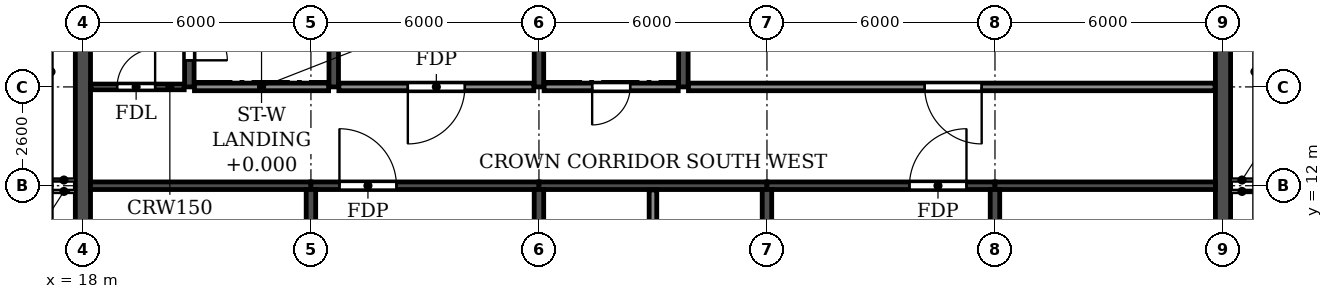
"""IFC4 building model, lengths in metres.
Left out: names, types, materials, properties, quantities, classifications, styles, units other than length and angle.
Written with IfcOpenShell. Run it as: python <this file> out.ifc"""

import sys

from ifc_helpers import new_model, si_unit, direction, frame, frame_2d, origin, place, context, subcontext, project, spatial, rectangle, extrude, element, fill, save


model = new_model("IFC4")
c1 = context("Model", 3, precision=1e-05, world=origin(), true_north=direction((0.0, 1.0)))
c2 = subcontext(c1, "Body", "Model", "MODEL_VIEW")
j1 = project(units=[si_unit("LENGTHUNIT", "METRE"), si_unit("PLANEANGLEUNIT", "RADIAN")], contexts=[c1])
p1 = place(None, origin())
s1 = spatial("IfcSite", under=j1, at=p1, CompositionType="ELEMENT")
p2 = place(p1, origin())
s2 = spatial("IfcBuilding", under=s1, at=p2, CompositionType="ELEMENT")
p3 = place(p2, frame((0.0, 0.0, 282.3)))
s3 = spatial("IfcBuildingStorey", under=s2, at=p3, CompositionType="ELEMENT", Elevation=282.3)
for number, where, z_axis, x_axis in (
    (1, (24.0, 0.2, 0.0), (0.0, 0.0, 1.0), (0.0, 1.0, 0.0)),
    (2, (30.0, 0.2, 0.0), (0.0, 0.0, 1.0), (0.0, 1.0, 0.0)),
    (3, (36.0, 0.2, 0.0), (0.0, 0.0, 1.0), (0.0, 1.0, 0.0)),
    (4, (42.0, 0.2, 0.0), (0.0, 0.0, 1.0), (0.0, 1.0, 0.0)),
):
    element("IfcWall", number, at=place(p3, frame(where, z_axis=z_axis, x_axis=x_axis)), inside=s3, PredefinedType="SHEAR", context=c2, shape_type="SweptSolid", body=[
        extrude(rectangle(XDim=11.7, YDim=0.25, at=frame_2d((5.85, 0.0))), origin(), (0.0, 0.0, 1.0), 3.05),
    ])
p4 = place(p3, frame((18.0, 4.683, 0.0), z_axis=(0.0, 0.0, 1.0), x_axis=(0.0, 1.0, 0.0)))
e5 = element("IfcWall", 5, at=p4, inside=s3, PredefinedType="SHEAR", context=c2, shape_type="SweptSolid", body=[
    extrude(rectangle(XDim=31.834, YDim=0.4, at=frame_2d((15.917, 0.0))), origin(), (0.0, 0.0, 1.0), 3.05),
])
p5 = place(p3, frame((48.0, 0.2, 0.0), z_axis=(0.0, 0.0, 1.0), x_axis=(0.0, 1.0, 0.0)))
e6 = element("IfcWall", 6, at=p5, inside=s3, PredefinedType="SHEAR", context=c2, shape_type="SweptSolid", body=[
    extrude(rectangle(XDim=40.8, YDim=0.4, at=frame_2d((20.4, 0.0))), origin(), (0.0, 0.0, 1.0), 3.05),
])
p6 = place(p3, frame((18.2, 12.0, 0.0), z_axis=(0.0, 0.0, 1.0), x_axis=(1.0, 0.0, 0.0)))
e7 = element("IfcWall", 7, at=p6, inside=s3, PredefinedType="SHEAR", context=c2, shape_type="SweptSolid", body=[
    extrude(rectangle(XDim=5.8, YDim=0.2, at=frame_2d((2.9, 0.0))), origin(), (0.0, 0.0, 1.0), 2.45),
])
p7 = place(p3, frame((24.0, 12.0, 0.0), z_axis=(0.0, 0.0, 1.0), x_axis=(1.0, 0.0, 0.0)))
e8 = element("IfcWall", 8, at=p7, inside=s3, PredefinedType="SHEAR", context=c2, shape_type="SweptSolid", body=[
    extrude(rectangle(XDim=6.0, YDim=0.2, at=frame_2d((3.0, 0.0))), origin(), (0.0, 0.0, 1.0), 2.45),
])
p8 = place(p7, frame((0.75, 0.0, 0.0)))
e9 = element("IfcOpeningElement", 9, at=p8, cuts=e8, PredefinedType="OPENING", context=c2, shape_type="SweptSolid", body=[
    extrude(rectangle(XDim=1.5, YDim=2.1, at=frame_2d((0.75, 1.05))), frame((0.0, 0.11, 0.0), z_axis=(0.0, -1.0, 0.0), x_axis=(1.0, 0.0, 0.0)), (0.0, 0.0, 1.0), 0.22),
])
p9 = place(p3, frame((30.0, 12.0, 0.0), z_axis=(0.0, 0.0, 1.0), x_axis=(1.0, 0.0, 0.0)))
e10 = element("IfcWall", 10, at=p9, inside=s3, PredefinedType="SHEAR", context=c2, shape_type="SweptSolid", body=[
    extrude(rectangle(XDim=6.0, YDim=0.2, at=frame_2d((3.0, 0.0))), origin(), (0.0, 0.0, 1.0), 2.45),
])
p10 = place(p3, frame((36.0, 12.0, 0.0), z_axis=(0.0, 0.0, 1.0), x_axis=(1.0, 0.0, 0.0)))
e11 = element("IfcWall", 11, at=p10, inside=s3, PredefinedType="SHEAR", context=c2, shape_type="SweptSolid", body=[
    extrude(rectangle(XDim=6.0, YDim=0.2, at=frame_2d((3.0, 0.0))), origin(), (0.0, 0.0, 1.0), 2.45),
])
p11 = place(p10, frame((3.75, 0.0, 0.0)))
e12 = element("IfcOpeningElement", 12, at=p11, cuts=e11, PredefinedType="OPENING", context=c2, shape_type="SweptSolid", body=[
    extrude(rectangle(XDim=1.5, YDim=2.1, at=frame_2d((0.75, 1.05))), frame((0.0, 0.11, 0.0), z_axis=(0.0, -1.0, 0.0), x_axis=(1.0, 0.0, 0.0)), (0.0, 0.0, 1.0), 0.22),
])
p12 = place(p3, frame((42.0, 12.0, 0.0), z_axis=(0.0, 0.0, 1.0), x_axis=(1.0, 0.0, 0.0)))
e13 = element("IfcWall", 13, at=p12, inside=s3, PredefinedType="SHEAR", context=c2, shape_type="SweptSolid", body=[
    extrude(rectangle(XDim=5.8, YDim=0.2, at=frame_2d((2.9, 0.0))), origin(), (0.0, 0.0, 1.0), 2.45),
])
p13 = place(p3, frame((20.8, 14.6, 0.0), z_axis=(0.0, 0.0, 1.0), x_axis=(0.0, 1.0, 0.0)))
e14 = element("IfcWall", 14, at=p13, inside=s3, PredefinedType="SOLIDWALL", context=c2, shape_type="SweptSolid", body=[
    extrude(rectangle(XDim=7.875, YDim=0.25, at=frame_2d((3.938, 0.0))), origin(), (0.0, 0.0, 1.0), 3.05),
])
p14 = place(p13, frame((0.7, 0.0, 0.0)))
e15 = element("IfcOpeningElement", 15, at=p14, cuts=e14, PredefinedType="OPENING", context=c2, shape_type="SweptSolid", body=[
    extrude(rectangle(XDim=1.0, YDim=2.1, at=frame_2d((0.5, 1.05))), frame((0.0, 0.135, 0.0), z_axis=(0.0, -1.0, 0.0), x_axis=(1.0, 0.0, 0.0)), (0.0, 0.0, 1.0), 0.27),
])
for number, where, z_axis, x_axis in (
    (16, (24.6, 14.6, 0.0), (0.0, 0.0, 1.0), (0.0, 1.0, 0.0)),
    (17, (30.0, 14.6, 0.0), (0.0, 0.0, 1.0), (0.0, 1.0, 0.0)),
    (18, (33.8, 14.6, 0.0), (0.0, 0.0, 1.0), (0.0, 1.0, 0.0)),
):
    element("IfcWall", number, at=place(p3, frame(where, z_axis=z_axis, x_axis=x_axis)), inside=s3, PredefinedType="SOLIDWALL", context=c2, shape_type="SweptSolid", body=[
        extrude(rectangle(XDim=7.875, YDim=0.25, at=frame_2d((3.938, 0.0))), origin(), (0.0, 0.0, 1.0), 3.05),
    ])
p15 = place(p3, frame((18.21, 14.6, 0.0), z_axis=(0.0, 0.0, 1.0), x_axis=(1.0, 0.0, 0.0)))
e19 = element("IfcWall", 19, at=p15, inside=s3, PredefinedType="PARTITIONING", context=c2, shape_type="SweptSolid", body=[
    extrude(rectangle(XDim=2.455, YDim=0.15, at=frame_2d((1.228, 0.0))), origin(), (0.0, 0.0, 1.0), 3.05),
])
p16 = place(p15, frame((0.69, 0.0, 0.0)))
e20 = element("IfcOpeningElement", 20, at=p16, cuts=e19, PredefinedType="OPENING", context=c2, shape_type="SweptSolid", body=[
    extrude(rectangle(XDim=1.0, YDim=2.1, at=frame_2d((0.5, 1.05))), frame((0.0, 0.085, 0.0), z_axis=(0.0, -1.0, 0.0), x_axis=(1.0, 0.0, 0.0)), (0.0, 0.0, 1.0), 0.17),
])
p17 = place(p3, frame((24.735, 14.6, 0.0), z_axis=(0.0, 0.0, 1.0), x_axis=(1.0, 0.0, 0.0)))
e21 = element("IfcWall", 21, at=p17, inside=s3, PredefinedType="PARTITIONING", context=c2, shape_type="SweptSolid", body=[
    extrude(rectangle(XDim=5.13, YDim=0.2, at=frame_2d((2.565, 0.0))), origin(), (0.0, 0.0, 1.0), 3.05),
])
p18 = place(p17, frame((1.815, 0.0, 0.0)))
e22 = element("IfcOpeningElement", 22, at=p18, cuts=e21, PredefinedType="OPENING", context=c2, shape_type="SweptSolid", body=[
    extrude(rectangle(XDim=1.5, YDim=2.1, at=frame_2d((0.75, 1.05))), frame((0.0, 0.11, 0.0), z_axis=(0.0, -1.0, 0.0), x_axis=(1.0, 0.0, 0.0)), (0.0, 0.0, 1.0), 0.22),
])
p19 = place(p3, frame((33.935, 14.6, 0.0), z_axis=(0.0, 0.0, 1.0), x_axis=(1.0, 0.0, 0.0)))
e23 = element("IfcWall", 23, at=p19, inside=s3, PredefinedType="PARTITIONING", context=c2, shape_type="SweptSolid", body=[
    extrude(rectangle(XDim=13.855, YDim=0.2, at=frame_2d((6.927, 0.0))), origin(), (0.0, 0.0, 1.0), 3.05),
])
p20 = place(p19, frame((6.215, 0.0, 0.0)))
e24 = element("IfcOpeningElement", 24, at=p20, cuts=e23, PredefinedType="OPENING", context=c2, shape_type="SweptSolid", body=[
    extrude(rectangle(XDim=1.5, YDim=2.1, at=frame_2d((0.75, 1.05))), frame((0.0, 0.11, 0.0), z_axis=(0.0, -1.0, 0.0), x_axis=(1.0, 0.0, 0.0)), (0.0, 0.0, 1.0), 0.22),
])
p21 = place(p3, frame((33.0, 0.06, 0.0), z_axis=(0.0, 0.0, 1.0), x_axis=(0.0, 1.0, 0.0)))
e25 = element("IfcWall", 25, at=p21, inside=s3, PredefinedType="PARTITIONING", context=c2, shape_type="SweptSolid", body=[
    extrude(rectangle(XDim=11.83, YDim=0.2, at=frame_2d((5.915, 0.0))), origin(), (0.0, 0.0, 1.0), 3.05),
])
p22 = place(p3, frame((20.935, 14.6, 0.0), z_axis=(0.0, 0.0, 1.0), x_axis=(1.0, 0.0, 0.0)))
e26 = element("IfcWall", 26, at=p22, inside=s3, PredefinedType="PARTITIONING", context=c2, shape_type="SweptSolid", body=[
    extrude(rectangle(XDim=3.53, YDim=0.2, at=frame_2d((1.765, 0.0))), origin(), (0.0, 0.0, 1.0), 3.05),
])
p23 = place(p3, frame((30.135, 14.6, 0.0), z_axis=(0.0, 0.0, 1.0), x_axis=(1.0, 0.0, 0.0)))
e27 = element("IfcWall", 27, at=p23, inside=s3, PredefinedType="PARTITIONING", context=c2, shape_type="SweptSolid", body=[
    extrude(rectangle(XDim=3.53, YDim=0.2, at=frame_2d((1.765, 0.0))), origin(), (0.0, 0.0, 1.0), 3.05),
])
p24 = place(p23, frame((1.265, 0.0, 0.0)))
e28 = element("IfcOpeningElement", 28, at=p24, cuts=e27, PredefinedType="OPENING", context=c2, shape_type="SweptSolid", body=[
    extrude(rectangle(XDim=1.0, YDim=2.1, at=frame_2d((0.5, 1.05))), frame((0.0, 0.11, 0.0), z_axis=(0.0, -1.0, 0.0), x_axis=(1.0, 0.0, 0.0)), (0.0, 0.0, 1.0), 0.22),
])
p25 = place(p8, origin())
e29 = element("IfcDoor", 29, at=p25, inside=s3, OperationType="DOUBLE_DOOR_SINGLE_SWING", PredefinedType="DOOR", context=c2, shape_type="SweptSolid", body=[
    extrude(rectangle(XDim=1.5, YDim=2.1, at=frame_2d((0.75, 1.05))), frame((0.0, 0.025, 0.0), z_axis=(0.0, -1.0, 0.0), x_axis=(1.0, 0.0, 0.0)), (0.0, 0.0, 1.0), 0.05),
])
fill(e9, e29)
p26 = place(p18, frame((1.5, 0.0, 0.0), z_axis=(0.0, 0.0, 1.0), x_axis=(-1.0, 0.0, 0.0)))
e30 = element("IfcDoor", 30, at=p26, inside=s3, OperationType="DOUBLE_DOOR_SINGLE_SWING", PredefinedType="DOOR", context=c2, shape_type="SweptSolid", body=[
    extrude(rectangle(XDim=1.5, YDim=2.1, at=frame_2d((0.75, 1.05))), frame((0.0, 0.025, 0.0), z_axis=(0.0, -1.0, 0.0), x_axis=(1.0, 0.0, 0.0)), (0.0, 0.0, 1.0), 0.05),
])
fill(e22, e30)
p27 = place(p11, origin())
e31 = element("IfcDoor", 31, at=p27, inside=s3, OperationType="DOUBLE_DOOR_SINGLE_SWING", PredefinedType="DOOR", context=c2, shape_type="SweptSolid", body=[
    extrude(rectangle(XDim=1.5, YDim=2.1, at=frame_2d((0.75, 1.05))), frame((0.0, 0.025, 0.0), z_axis=(0.0, -1.0, 0.0), x_axis=(1.0, 0.0, 0.0)), (0.0, 0.0, 1.0), 0.05),
])
fill(e12, e31)
p28 = place(p20, frame((1.5, 0.0, 0.0), z_axis=(0.0, 0.0, 1.0), x_axis=(-1.0, 0.0, 0.0)))
e32 = element("IfcDoor", 32, at=p28, inside=s3, OperationType="DOUBLE_DOOR_SINGLE_SWING", PredefinedType="DOOR", context=c2, shape_type="SweptSolid", body=[
    extrude(rectangle(XDim=1.5, YDim=2.1, at=frame_2d((0.75, 1.05))), frame((0.0, 0.025, 0.0), z_axis=(0.0, -1.0, 0.0), x_axis=(1.0, 0.0, 0.0)), (0.0, 0.0, 1.0), 0.05),
])
fill(e24, e32)
p29 = place(p16, origin())
e33 = element("IfcDoor", 33, at=p29, inside=s3, OperationType="SINGLE_SWING_RIGHT", PredefinedType="DOOR", context=c2, shape_type="SweptSolid", body=[
    extrude(rectangle(XDim=1.0, YDim=2.1, at=frame_2d((0.5, 1.05))), frame((0.0, 0.025, 0.0), z_axis=(0.0, -1.0, 0.0), x_axis=(1.0, 0.0, 0.0)), (0.0, 0.0, 1.0), 0.05),
])
fill(e20, e33)
p30 = place(p14, frame((1.0, 0.0, 0.0), z_axis=(0.0, 0.0, 1.0), x_axis=(-1.0, 0.0, 0.0)))
e34 = element("IfcDoor", 34, at=p30, inside=s3, OperationType="SINGLE_SWING_RIGHT", PredefinedType="DOOR", context=c2, shape_type="SweptSolid", body=[
    extrude(rectangle(XDim=1.0, YDim=2.1, at=frame_2d((0.5, 1.05))), frame((0.0, 0.025, 0.0), z_axis=(0.0, -1.0, 0.0), x_axis=(1.0, 0.0, 0.0)), (0.0, 0.0, 1.0), 0.05),
])
fill(e15, e34)
p31 = place(p24, frame((1.0, 0.0, 0.0), z_axis=(0.0, 0.0, 1.0), x_axis=(-1.0, 0.0, 0.0)))
e35 = element("IfcDoor", 35, at=p31, inside=s3, OperationType="SINGLE_SWING_RIGHT", PredefinedType="DOOR", context=c2, shape_type="SweptSolid", body=[
    extrude(rectangle(XDim=1.0, YDim=2.1, at=frame_2d((0.5, 1.05))), frame((0.0, 0.025, 0.0), z_axis=(0.0, -1.0, 0.0), x_axis=(1.0, 0.0, 0.0)), (0.0, 0.0, 1.0), 0.05),
])
fill(e28, e35)
save(model, sys.argv[1])
